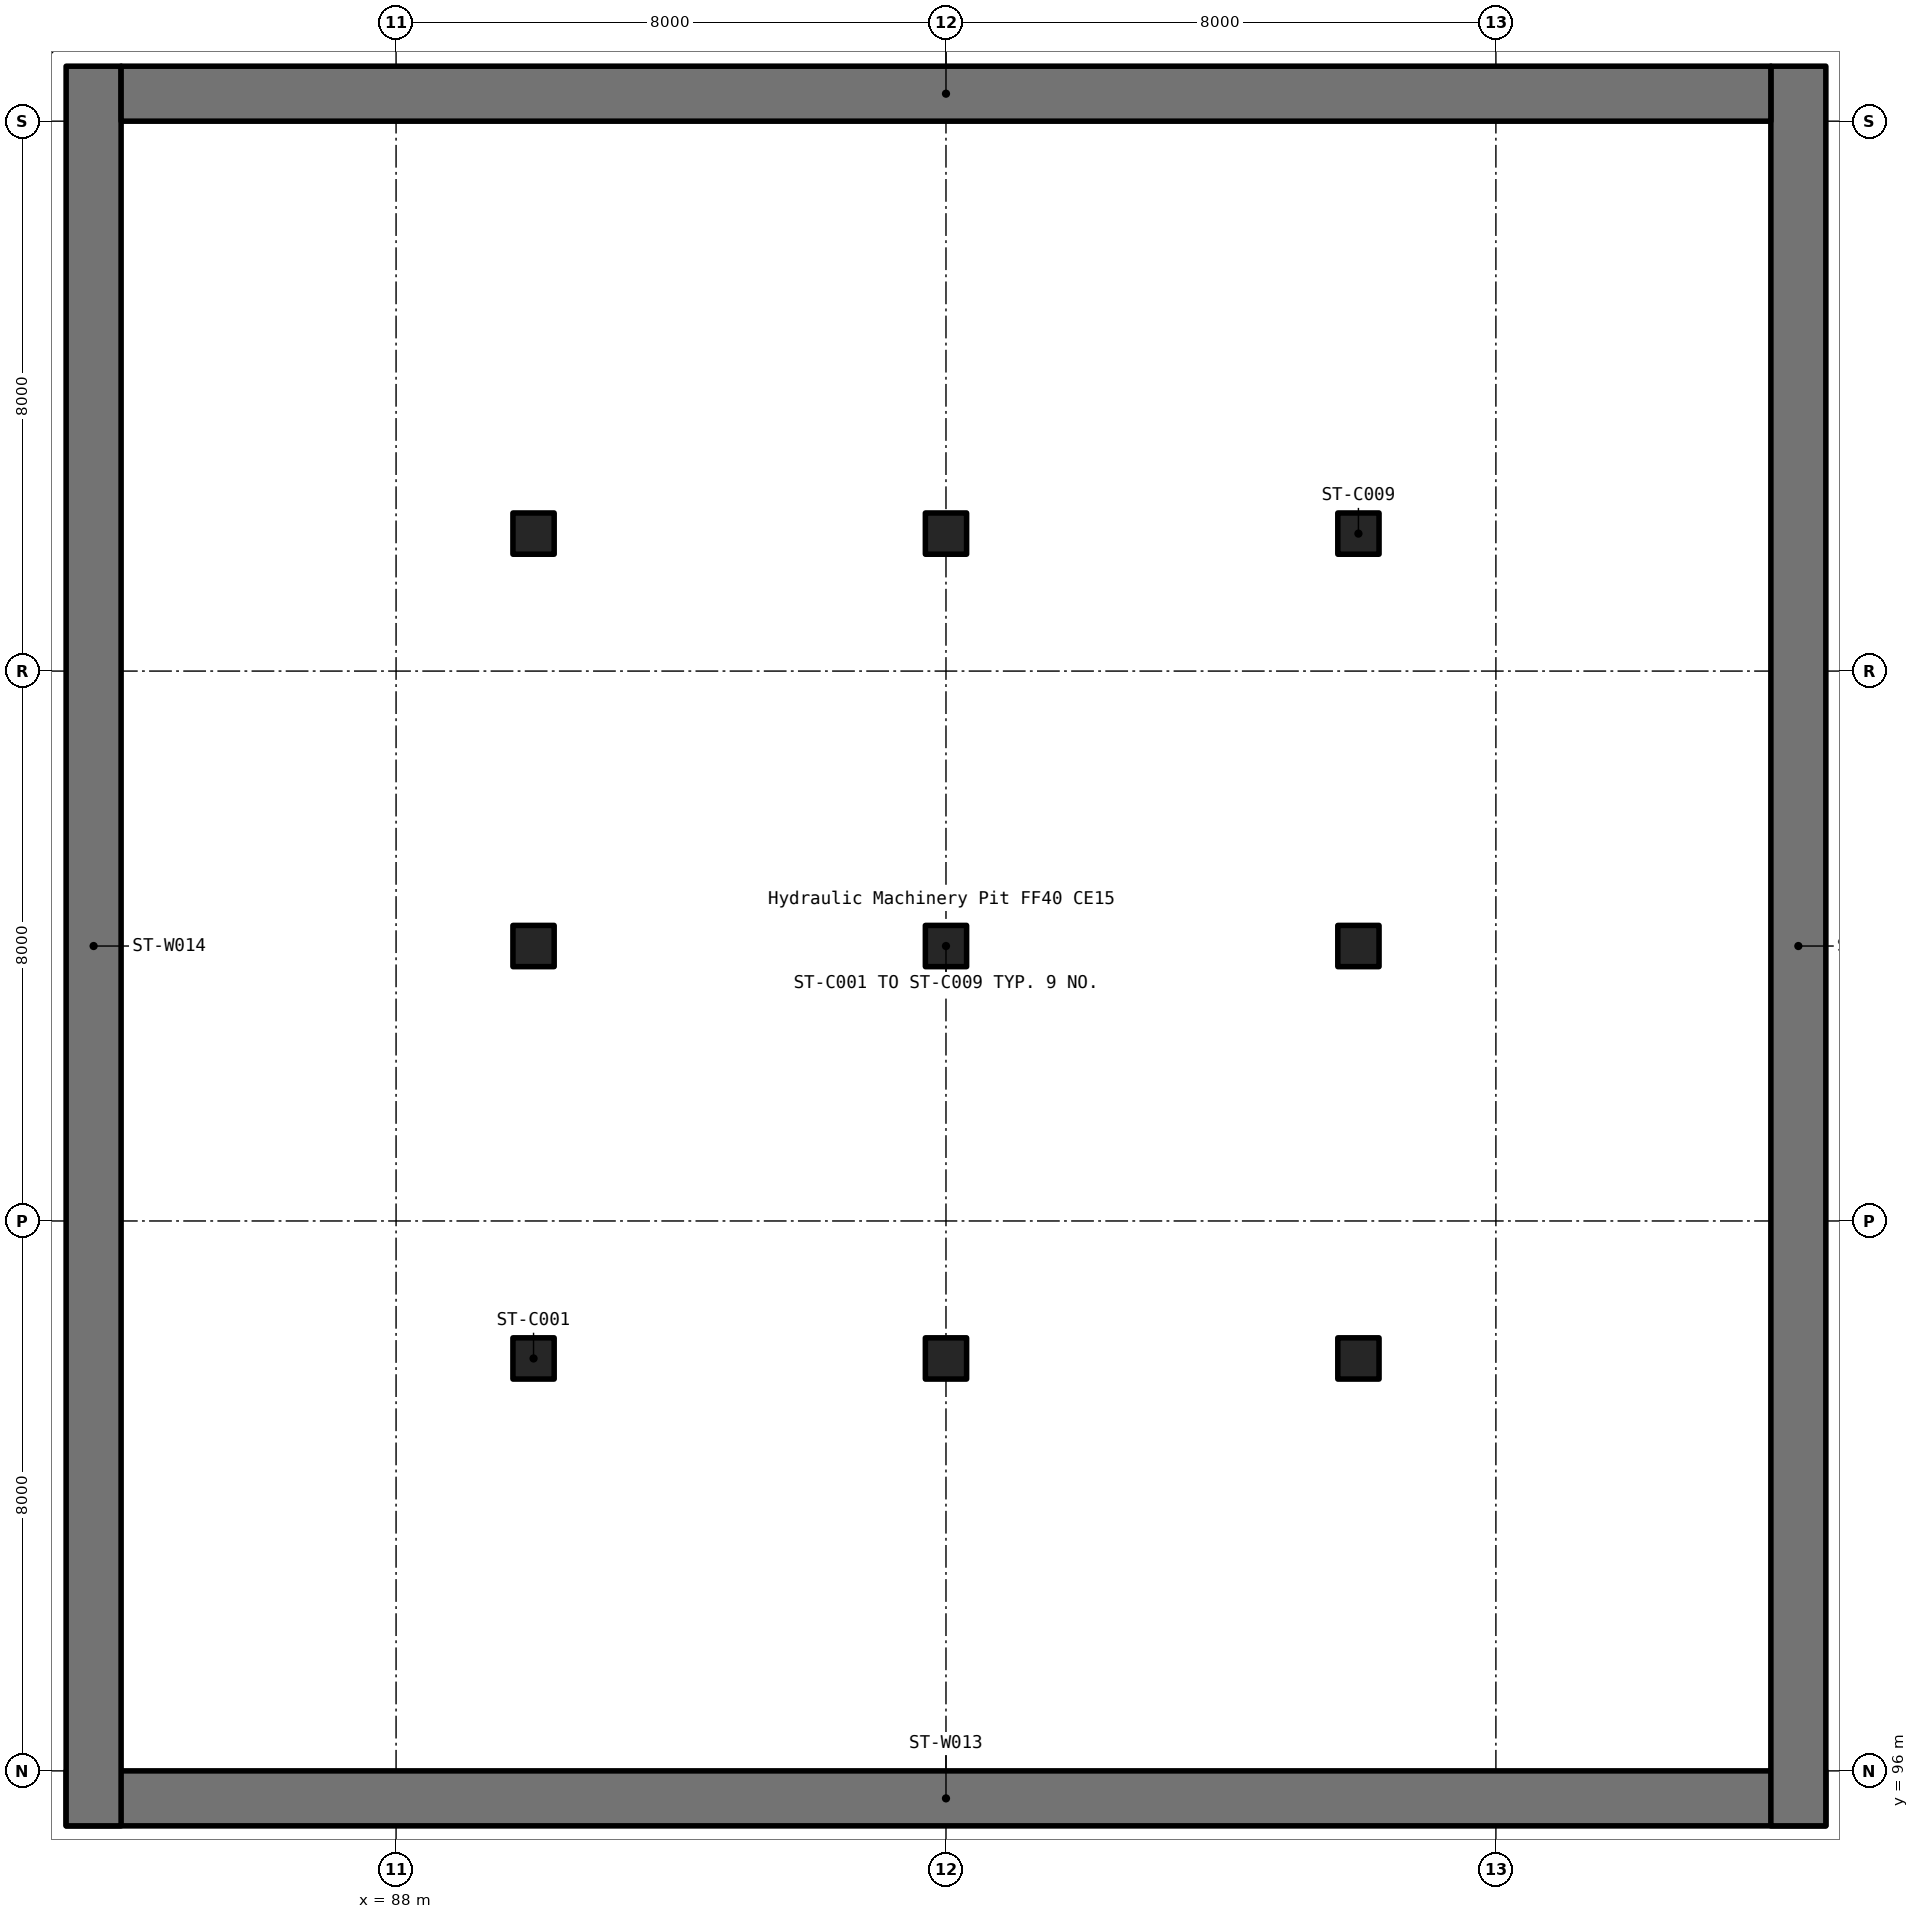
"""IFC4 building model, lengths in metres.
Left out: names, types, materials, properties, quantities, classifications, styles, units other than length and angle.
Written with IfcOpenShell. Run it as: python <this file> out.ifc"""

import sys

from ifc_helpers import new_model, si_unit, direction, frame, frame_2d, origin, origin_2d, place, context, subcontext, project, spatial, rectangle, extrude, element, save


model = new_model("IFC4")
c1 = context("Model", 3, precision=1e-05, world=origin(), true_north=direction((0.0, 1.0)))
c2 = subcontext(c1, "Body", "Model", "MODEL_VIEW")
j1 = project(units=[si_unit("LENGTHUNIT", "METRE"), si_unit("PLANEANGLEUNIT", "RADIAN")], contexts=[c1])
p1 = place(None, origin())
s1 = spatial("IfcSite", under=j1, at=p1, CompositionType="ELEMENT")
p2 = place(p1, origin())
s2 = spatial("IfcBuilding", under=s1, at=p2, CompositionType="ELEMENT")
p3 = place(p2, frame((0.0, 0.0, -10.5)))
s3 = spatial("IfcBuildingStorey", under=s2, at=p3, CompositionType="ELEMENT", Elevation=-10.5)
for number, where, z_axis, x_axis in (
    (1, (83.2, 95.6, -0.3), (0.0, 0.0, 1.0), (1.0, 0.0, 0.0)),
    (2, (83.6, 95.2, -0.3), (0.0, 0.0, 1.0), (0.0, 1.0, 0.0)),
    (3, (108.4, 95.2, -0.3), (0.0, 0.0, 1.0), (0.0, 1.0, 0.0)),
):
    element("IfcWall", number, at=place(p3, frame(where, z_axis=z_axis, x_axis=x_axis)), inside=s3, PredefinedType="SHEAR", context=c2, shape_type="SweptSolid", body=[
        extrude(rectangle(XDim=25.6, YDim=0.8, at=frame_2d((12.8, 0.0))), origin(), (0.0, 0.0, 1.0), 4.8),
    ])
p4 = place(p3, frame((84.0, 120.4, -0.3), z_axis=(0.0, 0.0, 1.0), x_axis=(1.0, 0.0, 0.0)))
e4 = element("IfcWall", 4, at=p4, inside=s3, PredefinedType="SHEAR", context=c2, shape_type="SweptSolid", body=[
    extrude(rectangle(XDim=24.0, YDim=0.8, at=frame_2d((12.0, 0.0))), origin(), (0.0, 0.0, 1.0), 4.8),
])
for number, where, z_axis, x_axis in (
    (5, (90.0, 102.0, 0.0), (0.0, 0.0, 1.0), (1.0, 0.0, 0.0)),
    (6, (90.0, 108.0, 0.0), (0.0, 0.0, 1.0), (1.0, 0.0, 0.0)),
    (7, (90.0, 114.0, 0.0), (0.0, 0.0, 1.0), (1.0, 0.0, 0.0)),
    (8, (96.0, 102.0, 0.0), (0.0, 0.0, 1.0), (1.0, 0.0, 0.0)),
    (9, (96.0, 108.0, 0.0), (0.0, 0.0, 1.0), (1.0, 0.0, 0.0)),
    (10, (96.0, 114.0, 0.0), (0.0, 0.0, 1.0), (1.0, 0.0, 0.0)),
    (11, (102.0, 102.0, 0.0), (0.0, 0.0, 1.0), (1.0, 0.0, 0.0)),
    (12, (102.0, 108.0, 0.0), (0.0, 0.0, 1.0), (1.0, 0.0, 0.0)),
    (13, (102.0, 114.0, 0.0), (0.0, 0.0, 1.0), (1.0, 0.0, 0.0)),
):
    element("IfcColumn", number, at=place(p3, frame(where, z_axis=z_axis, x_axis=x_axis)), inside=s3, PredefinedType="COLUMN", context=c2, shape_type="SweptSolid", body=[
        extrude(rectangle(XDim=0.6, YDim=0.6, at=origin_2d()), origin(), (0.0, 0.0, 1.0), 4.5),
    ])
save(model, sys.argv[1])
